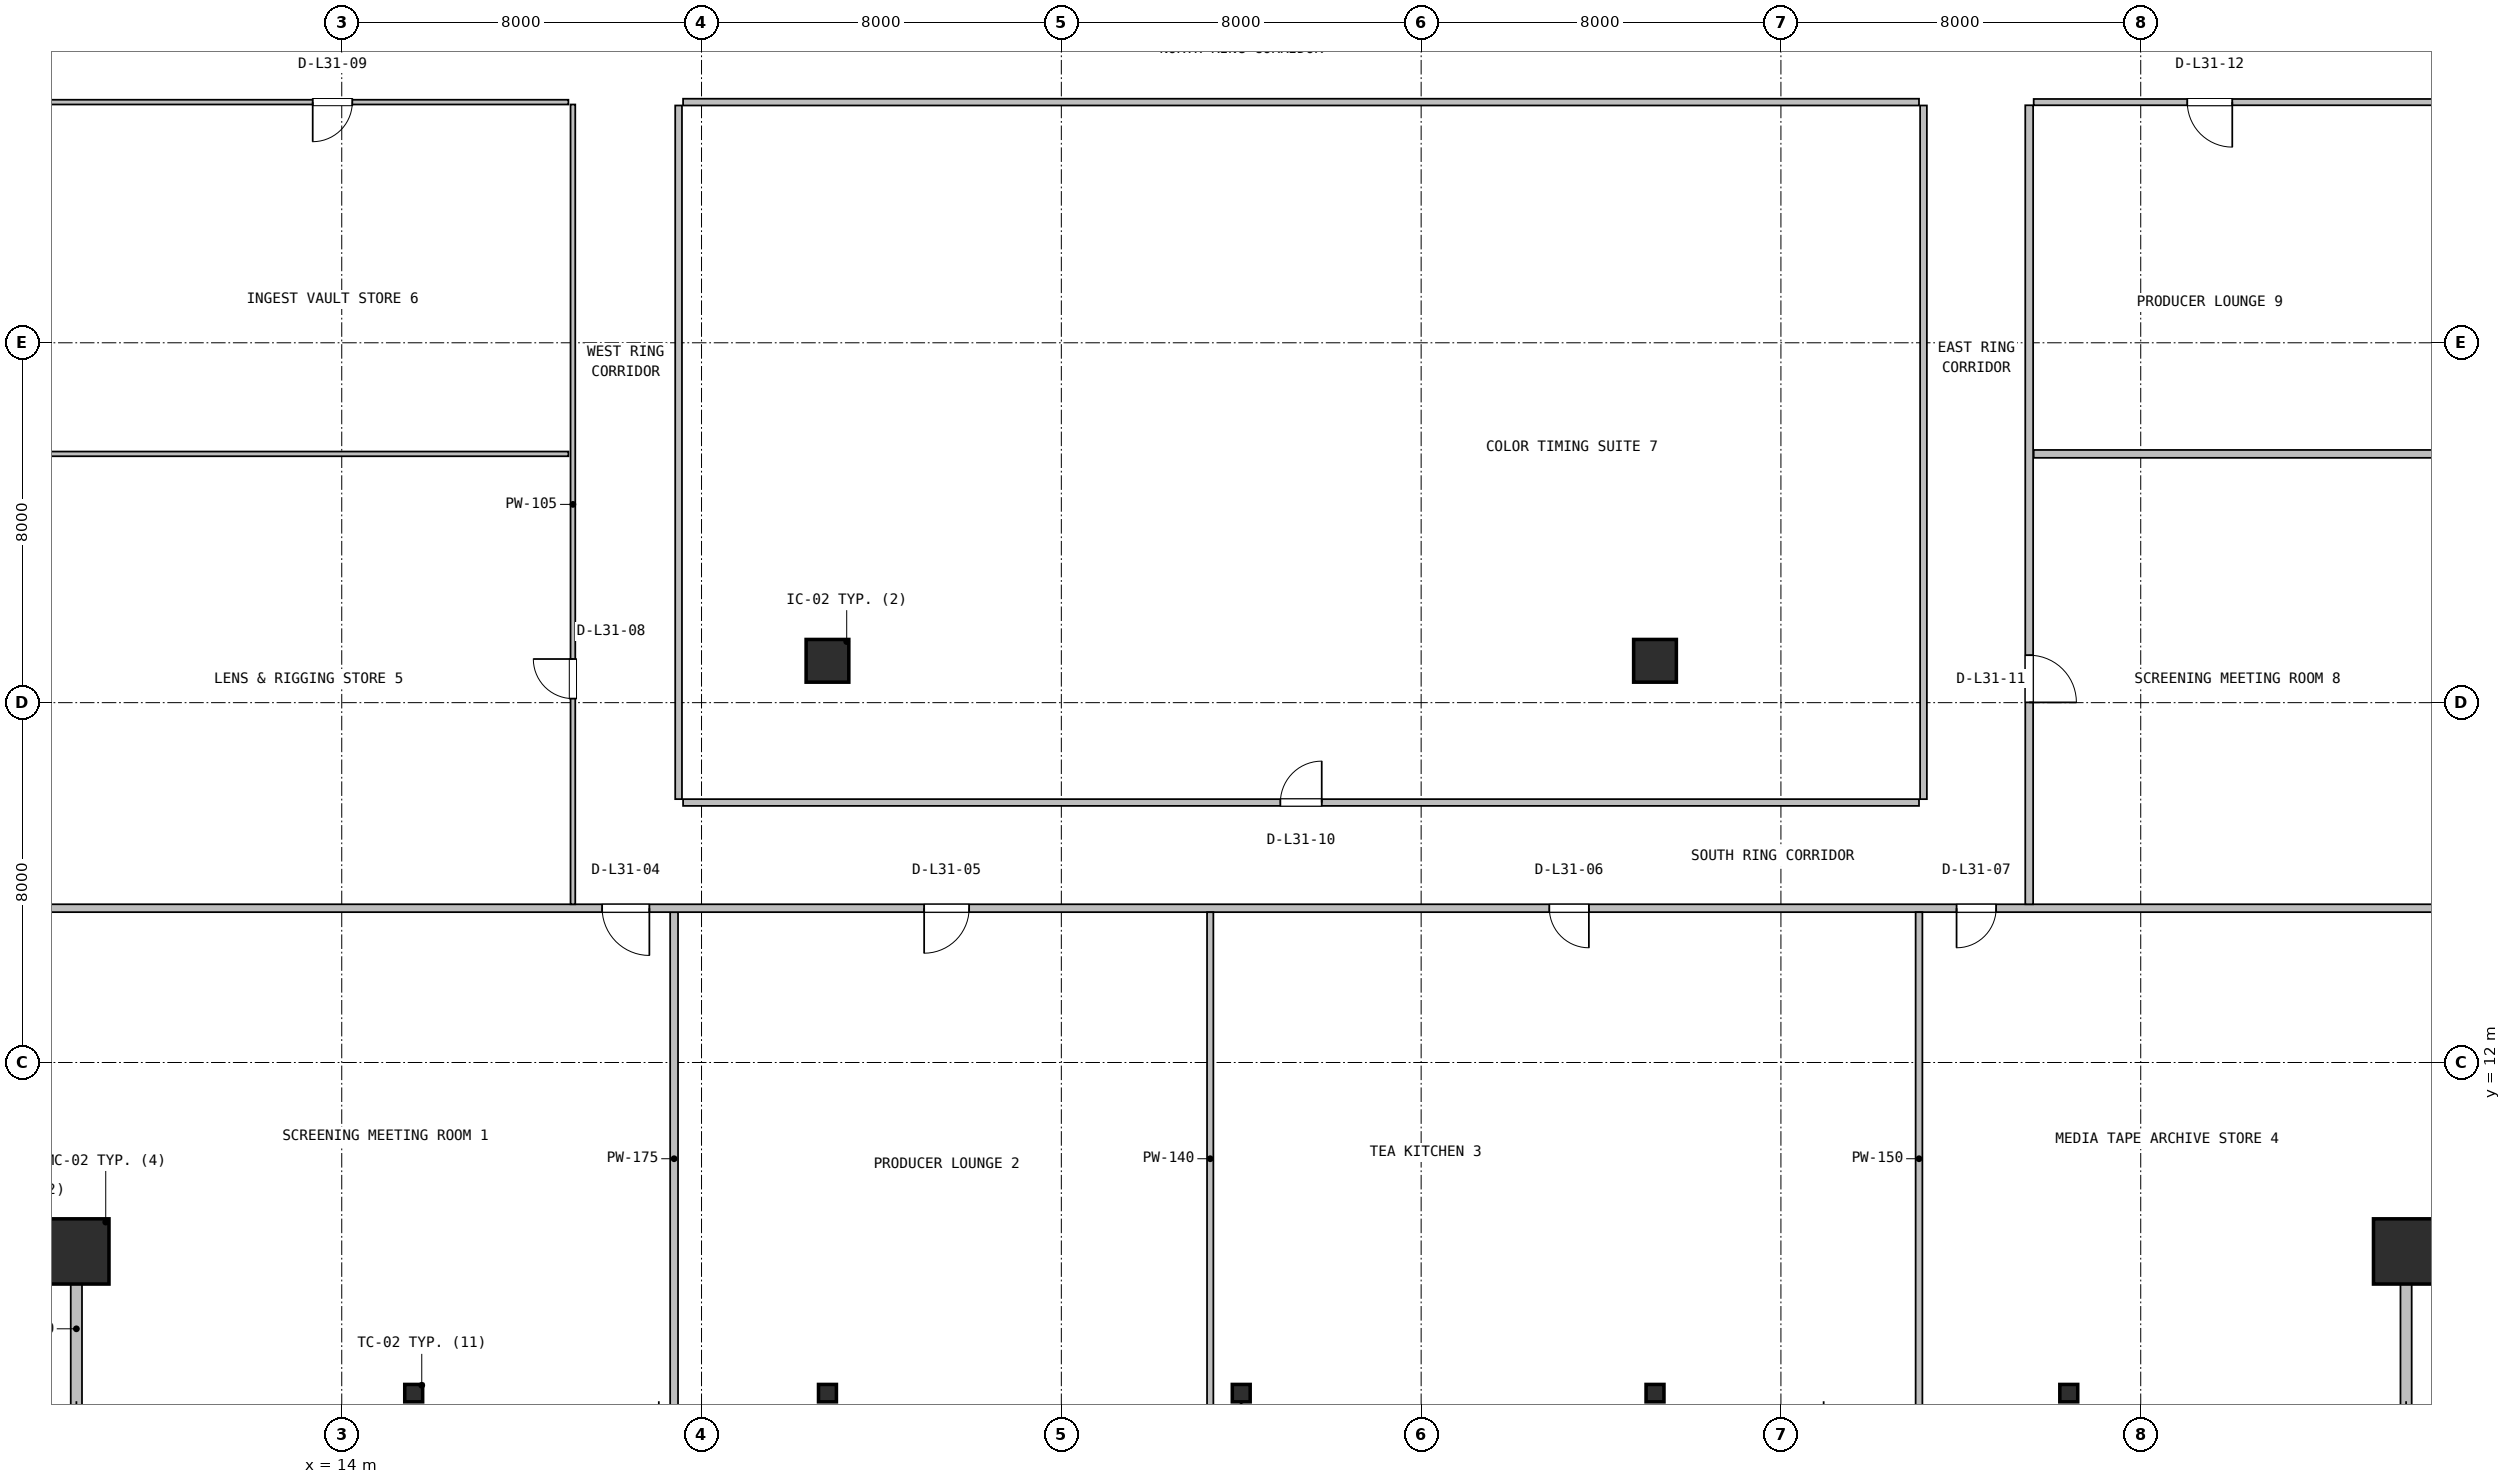
"""IFC4 building model, lengths in metres.
Left out: names, types, materials, properties, quantities, classifications, styles, units other than length and angle.
Written with IfcOpenShell. Run it as: python <this file> out.ifc"""

import sys

from ifc_helpers import new_model, si_unit, direction, frame, frame_2d, origin, origin_2d, place, context, subcontext, project, spatial, rectangle, hollow_rectangle, i_section, extrude, source, transform, mapped, element, fill, save


model = new_model("IFC4")
c1 = context("Model", 3, precision=1e-05, world=origin(), true_north=direction((0.0, 1.0)))
c2 = subcontext(c1, "Body", "Model", "MODEL_VIEW")
j1 = project(units=[si_unit("LENGTHUNIT", "METRE"), si_unit("PLANEANGLEUNIT", "RADIAN")], contexts=[c1])
p1 = place(None, origin())
s1 = spatial("IfcSite", under=j1, at=p1, CompositionType="ELEMENT")
p2 = place(p1, origin())
s2 = spatial("IfcBuilding", under=s1, at=p2, CompositionType="ELEMENT")
p3 = place(p2, frame((0.0, 0.0, 129.6)))
s3 = spatial("IfcBuildingStorey", under=s2, at=p3, CompositionType="ELEMENT", Elevation=129.6)
m1 = source(origin(), c2, "Body", "SweptSolid", [
    extrude(hollow_rectangle(XDim=1.45, YDim=1.45, WallThickness=0.055, at=origin_2d()), origin(), (0.0, 0.0, 1.0), 3.8),
])
for number, where, z_axis, x_axis in (
    (1, (8.1, 7.8, 0.0), (0.0, 0.0, 1.0), (1.0, 0.0, 0.0)),
    (2, (59.9, 7.8, 0.0), (0.0, 0.0, 1.0), (1.0, 0.0, 0.0)),
):
    element("IfcColumn", number, at=place(p3, frame(where, z_axis=z_axis, x_axis=x_axis)), inside=s3, PredefinedType="COLUMN", context=c2, shape_type="MappedRepresentation", body=[
        mapped(m1, transform((0.0, 0.0, 0.0), x_axis=(1.0, 0.0, 0.0), y_axis=(0.0, 1.0, 0.0), z_axis=(0.0, 0.0, 1.0), scale=1.0)),
    ])
m2 = source(origin(), c2, "Body", "SweptSolid", [
    extrude(i_section(OverallWidth=0.398, OverallDepth=0.387, WebThickness=0.021, FlangeThickness=0.033, FilletRadius=0.018, at=origin_2d()), origin(), (0.0, 0.0, 1.0), 3.8),
])
for number, where, z_axis, x_axis in (
    (3, (15.6, 4.65, 0.0), (0.0, 0.0, 1.0), (1.0, 0.0, 0.0)),
    (4, (24.8, 4.65, 0.0), (0.0, 0.0, 1.0), (1.0, 0.0, 0.0)),
    (5, (34.0, 4.65, 0.0), (0.0, 0.0, 1.0), (1.0, 0.0, 0.0)),
    (6, (43.2, 4.65, 0.0), (0.0, 0.0, 1.0), (1.0, 0.0, 0.0)),
    (7, (52.4, 4.65, 0.0), (0.0, 0.0, 1.0), (1.0, 0.0, 0.0)),
):
    element("IfcColumn", number, at=place(p3, frame(where, z_axis=z_axis, x_axis=x_axis)), inside=s3, PredefinedType="COLUMN", context=c2, shape_type="MappedRepresentation", body=[
        mapped(m2, transform((0.0, 0.0, 0.0), x_axis=(1.0, 0.0, 0.0), y_axis=(0.0, 1.0, 0.0), z_axis=(0.0, 0.0, 1.0), scale=1.0)),
    ])
m3 = source(origin(), c2, "Body", "SweptSolid", [
    extrude(rectangle(XDim=0.95, YDim=0.95, at=origin_2d()), origin(), (0.0, 0.0, 1.0), 3.8),
])
for number, where, z_axis, x_axis in (
    (8, (24.8, 20.93, 0.0), (0.0, 0.0, 1.0), (1.0, 0.0, 0.0)),
    (9, (43.2, 20.93, 0.0), (0.0, 0.0, 1.0), (1.0, 0.0, 0.0)),
):
    element("IfcColumn", number, at=place(p3, frame(where, z_axis=z_axis, x_axis=x_axis)), inside=s3, PredefinedType="COLUMN", context=c2, shape_type="MappedRepresentation", body=[
        mapped(m3, transform((0.0, 0.0, 0.0), x_axis=(1.0, 0.0, 0.0), y_axis=(0.0, 1.0, 0.0), z_axis=(0.0, 0.0, 1.0), scale=1.0)),
    ])
for number, where, z_axis, x_axis in (
    (10, (8.1, 4.28, 0.0), (0.0, 0.0, 1.0), (0.0, 1.0, 0.0)),
    (11, (59.9, 4.28, 0.0), (0.0, 0.0, 1.0), (0.0, 1.0, 0.0)),
):
    element("IfcWall", number, at=place(p3, frame(where, z_axis=z_axis, x_axis=x_axis)), inside=s3, PredefinedType="SOLIDWALL", context=c2, shape_type="SweptSolid", body=[
        extrude(rectangle(XDim=3.6, YDim=0.25, at=frame_2d((1.8, 0.0))), origin(), (0.0, 0.0, 1.0), 3.108),
    ])
p4 = place(p3, frame((21.39, 4.38, 0.0), z_axis=(0.0, 0.0, 1.0), x_axis=(0.0, 1.0, 0.0)))
e12 = element("IfcWall", 12, at=p4, inside=s3, PredefinedType="PARTITIONING", context=c2, shape_type="SweptSolid", body=[
    extrude(rectangle(XDim=10.962, YDim=0.175, at=frame_2d((5.481, 0.0))), origin(), (0.0, 0.0, 1.0), 3.108),
])
p5 = place(p3, frame((4.68, 15.43, 0.0), z_axis=(0.0, 0.0, 1.0), x_axis=(1.0, 0.0, 0.0)))
e13 = element("IfcWall", 13, at=p5, inside=s3, PredefinedType="PARTITIONING", context=c2, shape_type="SweptSolid", body=[
    extrude(rectangle(XDim=58.64, YDim=0.175, at=frame_2d((29.32, 0.0))), origin(), (0.0, 0.0, 1.0), 2.83),
])
p6 = place(p5, frame((15.11, 0.0, 0.0)))
e14 = element("IfcOpeningElement", 14, at=p6, cuts=e13, PredefinedType="OPENING", context=c2, shape_type="SweptSolid", body=[
    extrude(rectangle(XDim=1.05, YDim=2.1, at=frame_2d((0.525, 1.05))), frame((0.0, 0.098, 0.0), z_axis=(0.0, -1.0, 0.0), x_axis=(1.0, 0.0, 0.0)), (0.0, 0.0, 1.0), 0.195),
])
p7 = place(p5, frame((22.27, 0.0, 0.0)))
e15 = element("IfcOpeningElement", 15, at=p7, cuts=e13, PredefinedType="OPENING", context=c2, shape_type="SweptSolid", body=[
    extrude(rectangle(XDim=1.0, YDim=2.1, at=frame_2d((0.5, 1.05))), frame((0.0, 0.098, 0.0), z_axis=(0.0, -1.0, 0.0), x_axis=(1.0, 0.0, 0.0)), (0.0, 0.0, 1.0), 0.195),
])
p8 = place(p5, frame((36.17, 0.0, 0.0)))
e16 = element("IfcOpeningElement", 16, at=p8, cuts=e13, PredefinedType="OPENING", context=c2, shape_type="SweptSolid", body=[
    extrude(rectangle(XDim=0.88, YDim=2.06, at=frame_2d((0.44, 1.03))), frame((0.0, 0.098, 0.0), z_axis=(0.0, -1.0, 0.0), x_axis=(1.0, 0.0, 0.0)), (0.0, 0.0, 1.0), 0.195),
])
p9 = place(p5, frame((45.225, 0.0, 0.0)))
e17 = element("IfcOpeningElement", 17, at=p9, cuts=e13, PredefinedType="OPENING", context=c2, shape_type="SweptSolid", body=[
    extrude(rectangle(XDim=0.88, YDim=2.06, at=frame_2d((0.44, 1.03))), frame((0.0, 0.098, 0.0), z_axis=(0.0, -1.0, 0.0), x_axis=(1.0, 0.0, 0.0)), (0.0, 0.0, 1.0), 0.195),
])
p10 = place(p3, frame((33.31, 4.38, 0.0), z_axis=(0.0, 0.0, 1.0), x_axis=(0.0, 1.0, 0.0)))
e18 = element("IfcWall", 18, at=p10, inside=s3, PredefinedType="PARTITIONING", context=c2, shape_type="SweptSolid", body=[
    extrude(rectangle(XDim=10.962, YDim=0.14, at=frame_2d((5.481, 0.0))), origin(), (0.0, 0.0, 1.0), 3.108),
])
p11 = place(p3, frame((49.07, 4.38, 0.0), z_axis=(0.0, 0.0, 1.0), x_axis=(0.0, 1.0, 0.0)))
e19 = element("IfcWall", 19, at=p11, inside=s3, PredefinedType="PARTITIONING", context=c2, shape_type="SweptSolid", body=[
    extrude(rectangle(XDim=10.962, YDim=0.15, at=frame_2d((5.481, 0.0))), origin(), (0.0, 0.0, 1.0), 3.108),
])
p12 = place(p3, frame((19.14, 15.518, 0.0), z_axis=(0.0, 0.0, 1.0), x_axis=(0.0, 1.0, 0.0)))
e20 = element("IfcWall", 20, at=p12, inside=s3, PredefinedType="PARTITIONING", context=c2, shape_type="SweptSolid", body=[
    extrude(rectangle(XDim=17.779, YDim=0.105, at=frame_2d((8.89, 0.0))), origin(), (0.0, 0.0, 1.0), 3.222),
])
p13 = place(p12, frame((4.572, 0.0, 0.0)))
e21 = element("IfcOpeningElement", 21, at=p13, cuts=e20, PredefinedType="OPENING", context=c2, shape_type="SweptSolid", body=[
    extrude(rectangle(XDim=0.88, YDim=2.06, at=frame_2d((0.44, 1.03))), frame((0.0, 0.062, 0.0), z_axis=(0.0, -1.0, 0.0), x_axis=(1.0, 0.0, 0.0)), (0.0, 0.0, 1.0), 0.125),
])
p14 = place(p3, frame((4.68, 25.53, 0.0), z_axis=(0.0, 0.0, 1.0), x_axis=(1.0, 0.0, 0.0)))
e22 = element("IfcWall", 22, at=p14, inside=s3, PredefinedType="PARTITIONING", context=c2, shape_type="SweptSolid", body=[
    extrude(rectangle(XDim=14.36, YDim=0.105, at=frame_2d((7.18, 0.0))), origin(), (0.0, 0.0, 1.0), 3.108),
])
p15 = place(p3, frame((4.68, 33.35, 0.0), z_axis=(0.0, 0.0, 1.0), x_axis=(1.0, 0.0, 0.0)))
e23 = element("IfcWall", 23, at=p15, inside=s3, PredefinedType="PARTITIONING", context=c2, shape_type="SweptSolid", body=[
    extrude(rectangle(XDim=14.36, YDim=0.105, at=frame_2d((7.18, 0.0))), origin(), (0.0, 0.0, 1.0), 3.108),
])
p16 = place(p15, frame((8.675, 0.0, 0.0)))
e24 = element("IfcOpeningElement", 24, at=p16, cuts=e23, PredefinedType="OPENING", context=c2, shape_type="SweptSolid", body=[
    extrude(rectangle(XDim=0.88, YDim=2.06, at=frame_2d((0.44, 1.03))), frame((0.0, 0.062, 0.0), z_axis=(0.0, -1.0, 0.0), x_axis=(1.0, 0.0, 0.0)), (0.0, 0.0, 1.0), 0.125),
])
p17 = place(p3, frame((21.59, 17.78, 0.0), z_axis=(0.0, 0.0, 1.0), x_axis=(1.0, 0.0, 0.0)))
e25 = element("IfcWall", 25, at=p17, inside=s3, PredefinedType="PARTITIONING", context=c2, shape_type="SweptSolid", body=[
    extrude(rectangle(XDim=27.48, YDim=0.15, at=frame_2d((13.74, 0.0))), origin(), (0.0, 0.0, 1.0), 2.83),
])
p18 = place(p17, frame((13.28, 0.0, 0.0)))
e26 = element("IfcOpeningElement", 26, at=p18, cuts=e25, PredefinedType="OPENING", context=c2, shape_type="SweptSolid", body=[
    extrude(rectangle(XDim=0.92, YDim=2.08, at=frame_2d((0.46, 1.04))), frame((0.0, 0.085, 0.0), z_axis=(0.0, -1.0, 0.0), x_axis=(1.0, 0.0, 0.0)), (0.0, 0.0, 1.0), 0.17),
])
p19 = place(p3, frame((49.17, 17.855, 0.0), z_axis=(0.0, 0.0, 1.0), x_axis=(0.0, 1.0, 0.0)))
e27 = element("IfcWall", 27, at=p19, inside=s3, PredefinedType="PARTITIONING", context=c2, shape_type="SweptSolid", body=[
    extrude(rectangle(XDim=15.42, YDim=0.15, at=frame_2d((7.71, 0.0))), origin(), (0.0, 0.0, 1.0), 3.222),
])
p20 = place(p3, frame((21.59, 33.35, 0.0), z_axis=(0.0, 0.0, 1.0), x_axis=(1.0, 0.0, 0.0)))
e28 = element("IfcWall", 28, at=p20, inside=s3, PredefinedType="PARTITIONING", context=c2, shape_type="SweptSolid", body=[
    extrude(rectangle(XDim=27.48, YDim=0.15, at=frame_2d((13.74, 0.0))), origin(), (0.0, 0.0, 1.0), 2.83),
])
p21 = place(p3, frame((21.49, 17.855, 0.0), z_axis=(0.0, 0.0, 1.0), x_axis=(0.0, 1.0, 0.0)))
e29 = element("IfcWall", 29, at=p21, inside=s3, PredefinedType="PARTITIONING", context=c2, shape_type="SweptSolid", body=[
    extrude(rectangle(XDim=15.42, YDim=0.15, at=frame_2d((7.71, 0.0))), origin(), (0.0, 0.0, 1.0), 3.222),
])
p22 = place(p3, frame((51.62, 25.53, 0.0), z_axis=(0.0, 0.0, 1.0), x_axis=(1.0, 0.0, 0.0)))
e30 = element("IfcWall", 30, at=p22, inside=s3, PredefinedType="PARTITIONING", context=c2, shape_type="SweptSolid", body=[
    extrude(rectangle(XDim=11.7, YDim=0.175, at=frame_2d((5.85, 0.0))), origin(), (0.0, 0.0, 1.0), 3.108),
])
p23 = place(p3, frame((51.52, 15.518, 0.0), z_axis=(0.0, 0.0, 1.0), x_axis=(0.0, 1.0, 0.0)))
e31 = element("IfcWall", 31, at=p23, inside=s3, PredefinedType="PARTITIONING", context=c2, shape_type="SweptSolid", body=[
    extrude(rectangle(XDim=17.762, YDim=0.175, at=frame_2d((8.881, 0.0))), origin(), (0.0, 0.0, 1.0), 3.222),
])
p24 = place(p23, frame((4.487, 0.0, 0.0)))
e32 = element("IfcOpeningElement", 32, at=p24, cuts=e31, PredefinedType="OPENING", context=c2, shape_type="SweptSolid", body=[
    extrude(rectangle(XDim=1.05, YDim=2.1, at=frame_2d((0.525, 1.05))), frame((0.0, 0.098, 0.0), z_axis=(0.0, -1.0, 0.0), x_axis=(1.0, 0.0, 0.0)), (0.0, 0.0, 1.0), 0.195),
])
p25 = place(p3, frame((51.62, 33.35, 0.0), z_axis=(0.0, 0.0, 1.0), x_axis=(1.0, 0.0, 0.0)))
e33 = element("IfcWall", 33, at=p25, inside=s3, PredefinedType="PARTITIONING", context=c2, shape_type="SweptSolid", body=[
    extrude(rectangle(XDim=11.7, YDim=0.14, at=frame_2d((5.85, 0.0))), origin(), (0.0, 0.0, 1.0), 3.108),
])
p26 = place(p25, frame((3.415, 0.0, 0.0)))
e34 = element("IfcOpeningElement", 34, at=p26, cuts=e33, PredefinedType="OPENING", context=c2, shape_type="SweptSolid", body=[
    extrude(rectangle(XDim=1.0, YDim=2.1, at=frame_2d((0.5, 1.05))), frame((0.0, 0.08, 0.0), z_axis=(0.0, -1.0, 0.0), x_axis=(1.0, 0.0, 0.0)), (0.0, 0.0, 1.0), 0.16),
])
m4 = source(origin(), c2, "Body", "SweptSolid", [
    extrude(rectangle(XDim=1.05, YDim=2.1, at=frame_2d((0.525, 1.05))), frame((0.0, 0.025, 0.0), z_axis=(0.0, -1.0, 0.0), x_axis=(1.0, 0.0, 0.0)), (0.0, 0.0, 1.0), 0.05),
])
p27 = place(p6, frame((1.05, 0.0, 0.0), z_axis=(0.0, 0.0, 1.0), x_axis=(-1.0, 0.0, 0.0)))
e35 = element("IfcDoor", 35, at=p27, inside=s3, OperationType="SINGLE_SWING_RIGHT", PredefinedType="DOOR", context=c2, shape_type="MappedRepresentation", body=[
    mapped(m4, transform((0.0, 0.0, 0.0), x_axis=(1.0, 0.0, 0.0), y_axis=(0.0, 1.0, 0.0), z_axis=(0.0, 0.0, 1.0), scale=1.0)),
])
fill(e14, e35)
m5 = source(origin(), c2, "Body", "SweptSolid", [
    extrude(rectangle(XDim=1.0, YDim=2.1, at=frame_2d((0.5, 1.05))), frame((0.0, 0.025, 0.0), z_axis=(0.0, -1.0, 0.0), x_axis=(1.0, 0.0, 0.0)), (0.0, 0.0, 1.0), 0.05),
])
p28 = place(p7, frame((1.0, 0.0, 0.0), z_axis=(0.0, 0.0, 1.0), x_axis=(-1.0, 0.0, 0.0)))
e36 = element("IfcDoor", 36, at=p28, inside=s3, OperationType="SINGLE_SWING_LEFT", PredefinedType="DOOR", context=c2, shape_type="MappedRepresentation", body=[
    mapped(m5, transform((0.0, 0.0, 0.0), x_axis=(1.0, 0.0, 0.0), y_axis=(0.0, 1.0, 0.0), z_axis=(0.0, 0.0, 1.0), scale=1.0)),
])
fill(e15, e36)
m6 = source(origin(), c2, "Body", "SweptSolid", [
    extrude(rectangle(XDim=0.88, YDim=2.06, at=frame_2d((0.44, 1.03))), frame((0.0, 0.025, 0.0), z_axis=(0.0, -1.0, 0.0), x_axis=(1.0, 0.0, 0.0)), (0.0, 0.0, 1.0), 0.05),
])
p29 = place(p8, frame((0.88, 0.0, 0.0), z_axis=(0.0, 0.0, 1.0), x_axis=(-1.0, 0.0, 0.0)))
e37 = element("IfcDoor", 37, at=p29, inside=s3, OperationType="SINGLE_SWING_RIGHT", PredefinedType="DOOR", context=c2, shape_type="MappedRepresentation", body=[
    mapped(m6, transform((0.0, 0.0, 0.0), x_axis=(1.0, 0.0, 0.0), y_axis=(0.0, 1.0, 0.0), z_axis=(0.0, 0.0, 1.0), scale=1.0)),
])
fill(e16, e37)
p30 = place(p9, frame((0.88, 0.0, 0.0), z_axis=(0.0, 0.0, 1.0), x_axis=(-1.0, 0.0, 0.0)))
e38 = element("IfcDoor", 38, at=p30, inside=s3, OperationType="SINGLE_SWING_LEFT", PredefinedType="DOOR", context=c2, shape_type="MappedRepresentation", body=[
    mapped(m6, transform((0.0, 0.0, 0.0), x_axis=(1.0, 0.0, 0.0), y_axis=(0.0, 1.0, 0.0), z_axis=(0.0, 0.0, 1.0), scale=1.0)),
])
fill(e17, e38)
p31 = place(p13, origin())
e39 = element("IfcDoor", 39, at=p31, inside=s3, OperationType="SINGLE_SWING_RIGHT", PredefinedType="DOOR", context=c2, shape_type="MappedRepresentation", body=[
    mapped(m6, transform((0.0, 0.0, 0.0), x_axis=(1.0, 0.0, 0.0), y_axis=(0.0, 1.0, 0.0), z_axis=(0.0, 0.0, 1.0), scale=1.0)),
])
fill(e21, e39)
p32 = place(p16, frame((0.88, 0.0, 0.0), z_axis=(0.0, 0.0, 1.0), x_axis=(-1.0, 0.0, 0.0)))
e40 = element("IfcDoor", 40, at=p32, inside=s3, OperationType="SINGLE_SWING_LEFT", PredefinedType="DOOR", context=c2, shape_type="MappedRepresentation", body=[
    mapped(m6, transform((0.0, 0.0, 0.0), x_axis=(1.0, 0.0, 0.0), y_axis=(0.0, 1.0, 0.0), z_axis=(0.0, 0.0, 1.0), scale=1.0)),
])
fill(e24, e40)
m7 = source(origin(), c2, "Body", "SweptSolid", [
    extrude(rectangle(XDim=0.92, YDim=2.08, at=frame_2d((0.46, 1.04))), frame((0.0, 0.025, 0.0), z_axis=(0.0, -1.0, 0.0), x_axis=(1.0, 0.0, 0.0)), (0.0, 0.0, 1.0), 0.05),
])
p33 = place(p18, origin())
e41 = element("IfcDoor", 41, at=p33, inside=s3, OperationType="SINGLE_SWING_RIGHT", PredefinedType="DOOR", context=c2, shape_type="MappedRepresentation", body=[
    mapped(m7, transform((0.0, 0.0, 0.0), x_axis=(1.0, 0.0, 0.0), y_axis=(0.0, 1.0, 0.0), z_axis=(0.0, 0.0, 1.0), scale=1.0)),
])
fill(e26, e41)
p34 = place(p24, frame((1.05, 0.0, 0.0), z_axis=(0.0, 0.0, 1.0), x_axis=(-1.0, 0.0, 0.0)))
e42 = element("IfcDoor", 42, at=p34, inside=s3, OperationType="SINGLE_SWING_LEFT", PredefinedType="DOOR", context=c2, shape_type="MappedRepresentation", body=[
    mapped(m4, transform((0.0, 0.0, 0.0), x_axis=(1.0, 0.0, 0.0), y_axis=(0.0, 1.0, 0.0), z_axis=(0.0, 0.0, 1.0), scale=1.0)),
])
fill(e32, e42)
p35 = place(p26, frame((1.0, 0.0, 0.0), z_axis=(0.0, 0.0, 1.0), x_axis=(-1.0, 0.0, 0.0)))
e43 = element("IfcDoor", 43, at=p35, inside=s3, OperationType="SINGLE_SWING_RIGHT", PredefinedType="DOOR", context=c2, shape_type="MappedRepresentation", body=[
    mapped(m5, transform((0.0, 0.0, 0.0), x_axis=(1.0, 0.0, 0.0), y_axis=(0.0, 1.0, 0.0), z_axis=(0.0, 0.0, 1.0), scale=1.0)),
])
fill(e34, e43)
save(model, sys.argv[1])
